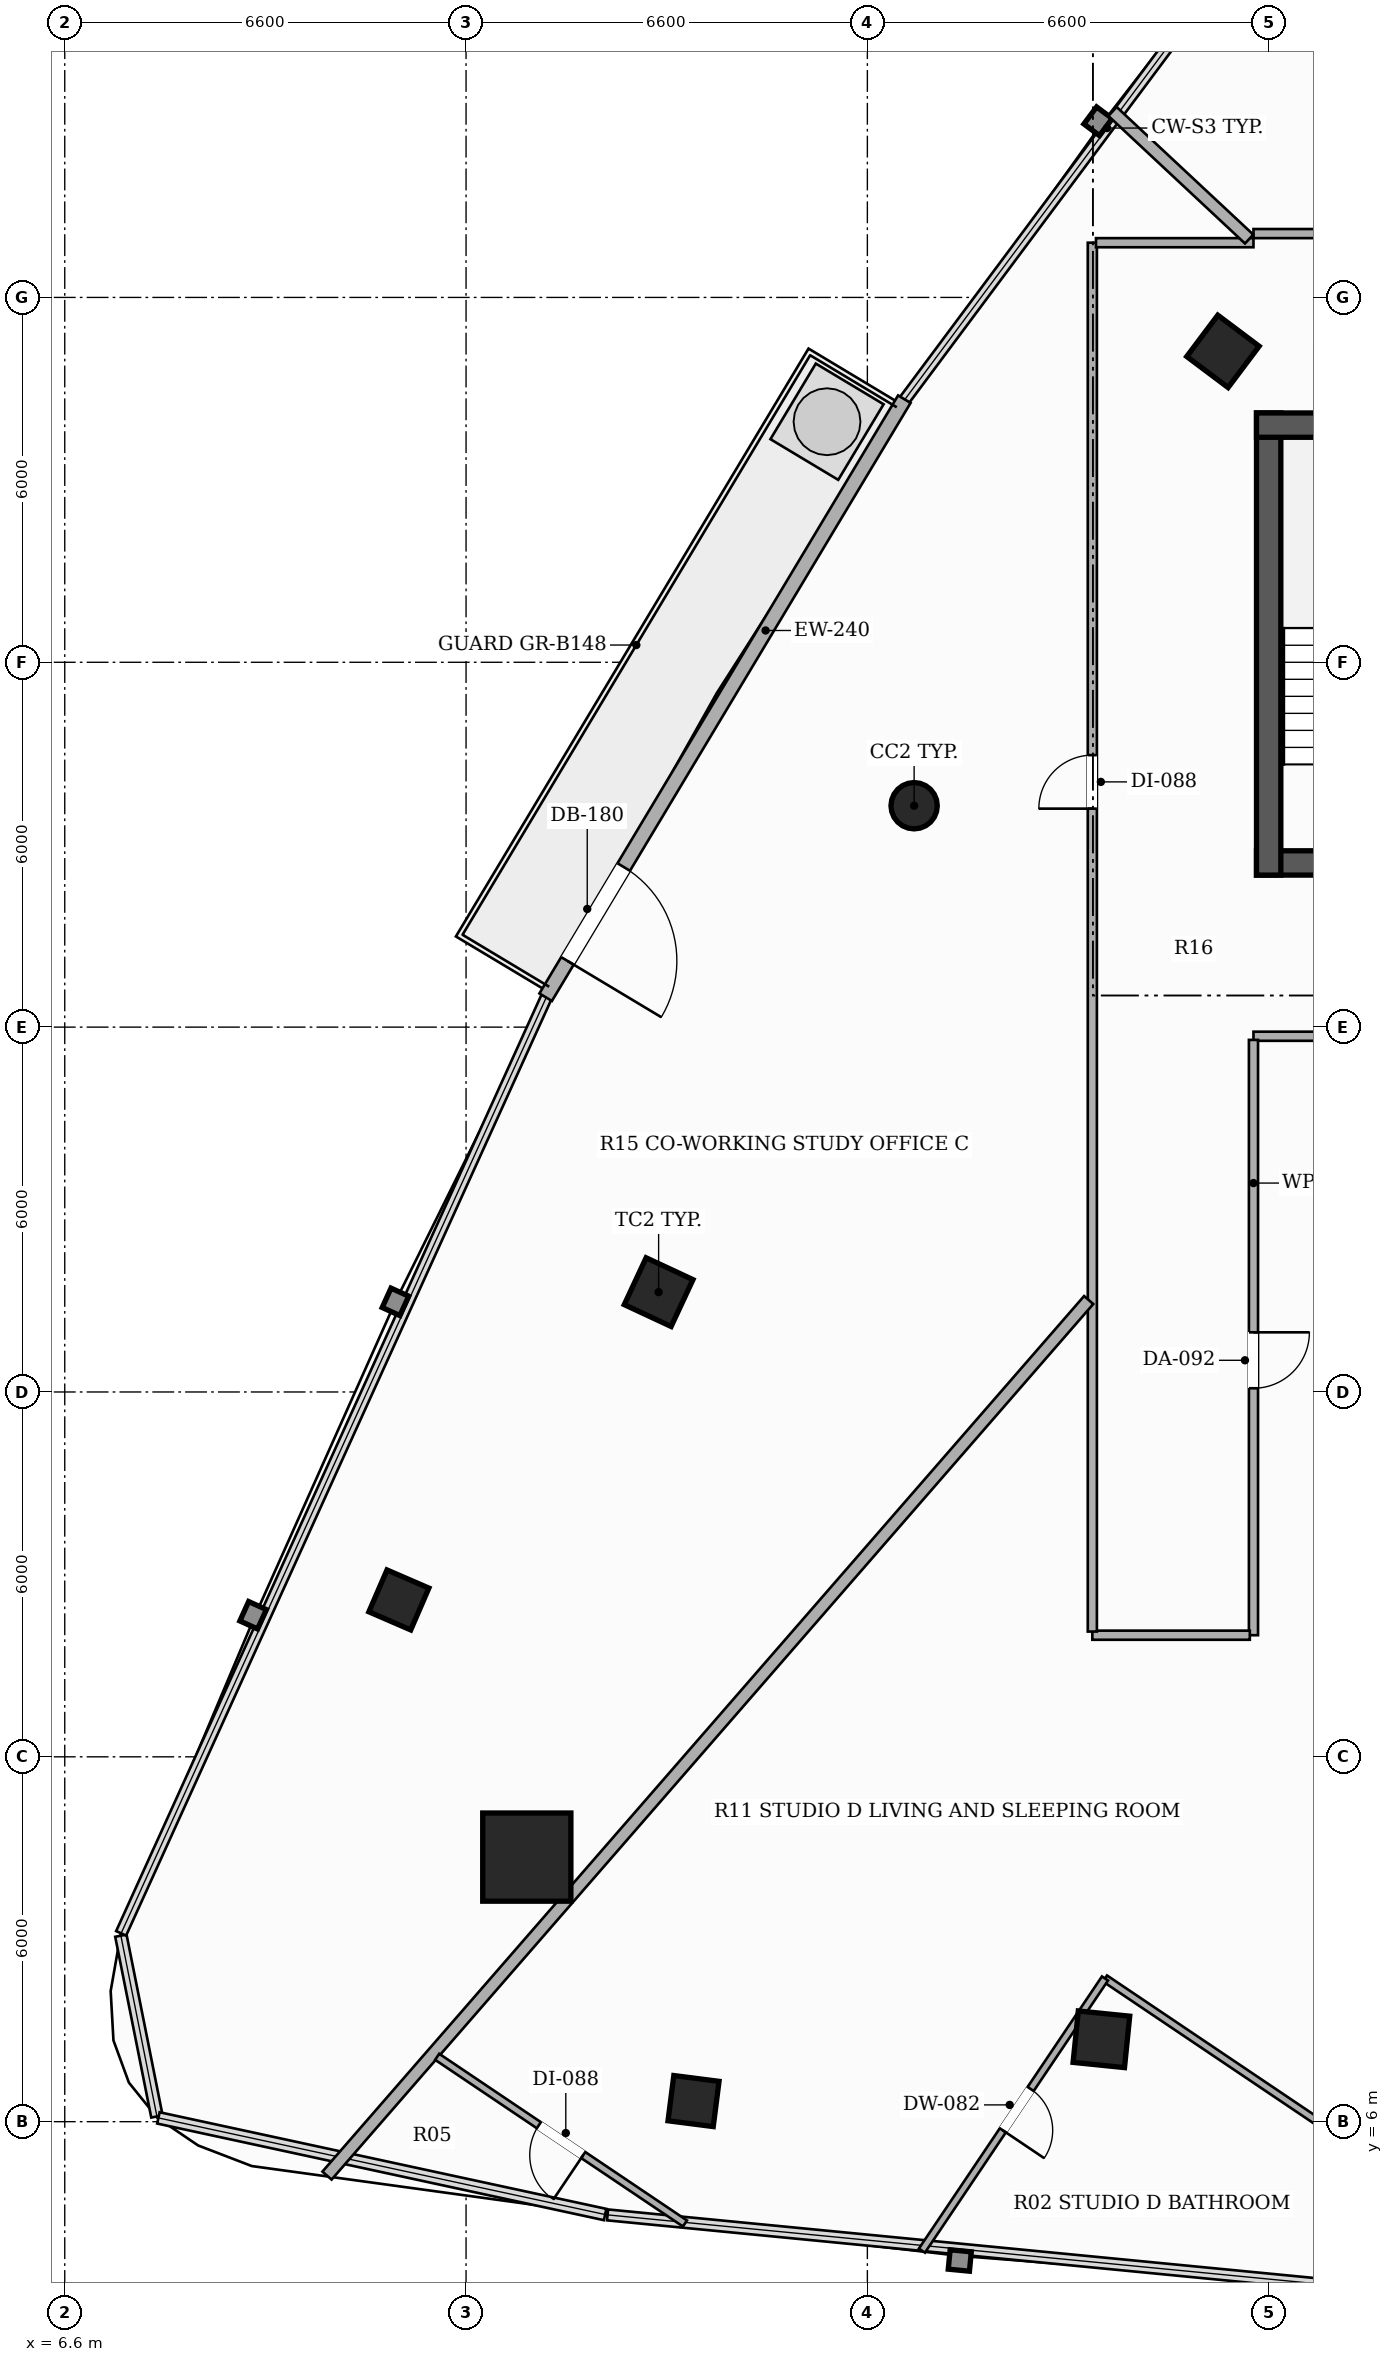
"""IFC4 building model, lengths in metres.
Left out: names, types, materials, properties, quantities, classifications, styles, units other than length and angle.
Written with IfcOpenShell. Run it as: python <this file> out.ifc"""

import sys

from ifc_helpers import new_model, si_unit, direction, frame, frame_2d, origin, origin_2d, place, context, subcontext, project, spatial, rectangle, hollow_rectangle, hollow_circle, extrude, element, fill, save


model = new_model("IFC4")
c1 = context("Model", 3, precision=1e-05, world=origin(), true_north=direction((0.0, 1.0)))
c2 = subcontext(c1, "Body", "Model", "MODEL_VIEW")
j1 = project(units=[si_unit("LENGTHUNIT", "METRE"), si_unit("PLANEANGLEUNIT", "RADIAN")], contexts=[c1])
p1 = place(None, origin())
s1 = spatial("IfcSite", under=j1, at=p1, CompositionType="ELEMENT")
p2 = place(p1, origin())
s2 = spatial("IfcBuilding", under=s1, at=p2, CompositionType="ELEMENT")
p3 = place(p2, frame((0.0, 0.0, 143.0)))
s3 = spatial("IfcBuildingStorey", under=s2, at=p3, CompositionType="ELEMENT", Elevation=143.0)
p4 = place(p3, frame((26.2, 26.7, 0.0), z_axis=(0.0, 0.0, 1.0), x_axis=(1.0, 0.0, 0.0)))
e1 = element("IfcWall", 1, at=p4, inside=s3, PredefinedType="SHEAR", context=c2, shape_type="SweptSolid", body=[
    extrude(rectangle(XDim=13.6, YDim=0.4, at=frame_2d((6.8, 0.0))), origin(), (0.0, 0.0, 1.0), 3.3),
])
p5 = place(p4, frame((4.35, 0.0, 0.0)))
e2 = element("IfcOpeningElement", 2, at=p5, cuts=e1, PredefinedType="OPENING", context=c2, shape_type="SweptSolid", body=[
    extrude(rectangle(XDim=1.05, YDim=2.15, at=frame_2d((0.525, 1.075))), frame((0.0, 0.21, 0.0), z_axis=(0.0, -1.0, 0.0), x_axis=(1.0, 0.0, 0.0)), (0.0, 0.0, 1.0), 0.42),
])
p6 = place(p4, frame((8.3, 0.0, 0.0)))
e3 = element("IfcOpeningElement", 3, at=p6, cuts=e1, PredefinedType="OPENING", context=c2, shape_type="SweptSolid", body=[
    extrude(rectangle(XDim=1.05, YDim=2.15, at=frame_2d((0.525, 1.075))), frame((0.0, 0.21, 0.0), z_axis=(0.0, -1.0, 0.0), x_axis=(1.0, 0.0, 0.0)), (0.0, 0.0, 1.0), 0.42),
])
p7 = place(p3, frame((26.4, 26.5, 0.0), z_axis=(0.0, 0.0, 1.0), x_axis=(0.0, 1.0, 0.0)))
e4 = element("IfcWall", 4, at=p7, inside=s3, PredefinedType="SHEAR", context=c2, shape_type="SweptSolid", body=[
    extrude(rectangle(XDim=7.6, YDim=0.4, at=frame_2d((3.8, 0.0))), origin(), (0.0, 0.0, 1.0), 3.3),
])
p8 = place(p3, frame((26.2, 33.9, 0.0), z_axis=(0.0, 0.0, 1.0), x_axis=(1.0, 0.0, 0.0)))
e5 = element("IfcWall", 5, at=p8, inside=s3, PredefinedType="SHEAR", context=c2, shape_type="SweptSolid", body=[
    extrude(rectangle(XDim=3.68, YDim=0.4, at=frame_2d((1.84, 0.0))), origin(), (0.0, 0.0, 1.0), 3.3),
])
p9 = place(p3, frame((14.199, 10.351, 0.0), z_axis=(0.0, 0.0, 1.0), x_axis=(1.0, 0.0, 0.0)))
e6 = element("IfcColumn", 6, at=p9, inside=s3, PredefinedType="COLUMN", context=c2, shape_type="SweptSolid", body=[
    extrude(hollow_rectangle(XDim=1.45, YDim=1.45, WallThickness=0.045, at=origin_2d()), origin(), (0.0, 0.0, 1.0), 3.3),
])
p10 = place(p3, frame((25.648, 35.113, 0.0), z_axis=(0.0, 0.0, 1.0), x_axis=(0.600420225326, 0.799684658487, 0.0)))
e7 = element("IfcColumn", 7, at=p10, inside=s3, PredefinedType="COLUMN", context=c2, shape_type="SweptSolid", body=[
    extrude(hollow_rectangle(XDim=0.85, YDim=0.85, WallThickness=0.028, at=origin_2d()), origin(), (0.0, 0.0, 1.0), 3.3),
])
p11 = place(p3, frame((20.569, 27.641, 0.0), z_axis=(0.0, 0.0, 1.0), x_axis=(1.0, 0.0, 0.0)))
e8 = element("IfcColumn", 8, at=p11, inside=s3, PredefinedType="COLUMN", context=c2, shape_type="SweptSolid", body=[
    extrude(hollow_circle(Radius=0.381, WallThickness=0.022, at=origin_2d()), origin(), (0.0, 0.0, 1.0), 3.3),
])
for number, where, z_axis, x_axis in (
    (9, (16.367, 19.642, 0.0), (0.0, 0.0, 1.0), (0.423, 0.906, 0.0)),
    (10, (23.649, 7.355, 0.0), (0.0, 0.0, 1.0), (-0.995, 0.101, 0.0)),
):
    element("IfcColumn", number, at=place(p3, frame(where, z_axis=z_axis, x_axis=x_axis)), inside=s3, PredefinedType="COLUMN", context=c2, shape_type="SweptSolid", body=[
        extrude(hollow_rectangle(XDim=0.85, YDim=0.85, WallThickness=0.028, at=origin_2d()), origin(), (0.0, 0.0, 1.0), 3.3),
    ])
for number, where, z_axis, x_axis in (
    (11, (12.095, 14.58, 0.0), (0.0, 0.0, 1.0), (0.397, 0.918, 0.0)),
    (12, (16.941, 6.339, 0.0), (0.0, 0.0, 1.0), (-0.992, 0.127, 0.0)),
):
    element("IfcColumn", number, at=place(p3, frame(where, z_axis=z_axis, x_axis=x_axis)), inside=s3, PredefinedType="COLUMN", context=c2, shape_type="SweptSolid", body=[
        extrude(hollow_rectangle(XDim=0.75, YDim=0.75, WallThickness=0.025, at=origin_2d()), origin(), (0.0, 0.0, 1.0), 3.3),
    ])
p12 = place(p3, frame((20.408, 34.327, 0.0), z_axis=(0.0, 0.0, 1.0), x_axis=(-0.514364263751, -0.857571807009, 0.0)))
e13 = element("IfcWall", 13, at=p12, inside=s3, PredefinedType="SOLIDWALL", context=c2, shape_type="SweptSolid", body=[
    extrude(rectangle(XDim=11.468, YDim=0.24, at=frame_2d((5.734, 0.0))), origin(), (0.0, 0.0, 1.0), 2.584),
])
p13 = place(p12, frame((8.972, 0.0, 0.0)))
e14 = element("IfcOpeningElement", 14, at=p13, cuts=e13, PredefinedType="OPENING", context=c2, shape_type="SweptSolid", body=[
    extrude(rectangle(XDim=1.8, YDim=2.2, at=frame_2d((0.9, 1.1))), frame((0.0, 0.13, 0.0), z_axis=(0.0, -1.0, 0.0), x_axis=(1.0, 0.0, 0.0)), (0.0, 0.0, 1.0), 0.26),
])
p14 = place(p3, frame((31.844, 23.85, 0.0), z_axis=(0.0, 0.0, 1.0), x_axis=(-1.0, 0.0, 0.0)))
e15 = element("IfcWall", 15, at=p14, inside=s3, PredefinedType="PARTITIONING", context=c2, shape_type="SweptSolid", body=[
    extrude(rectangle(XDim=5.694, YDim=0.15, at=frame_2d((2.847, 0.0))), origin(), (0.0, 0.0, 1.0), 2.681),
])
p15 = place(p3, frame((26.15, 23.79, 0.0), z_axis=(0.0, 0.0, 1.0), x_axis=(0.0, -1.0, 0.0)))
e16 = element("IfcWall", 16, at=p15, inside=s3, PredefinedType="PARTITIONING", context=c2, shape_type="SweptSolid", body=[
    extrude(rectangle(XDim=9.79, YDim=0.15, at=frame_2d((4.895, 0.0))), origin(), (0.0, 0.0, 1.0), 2.681),
])
p16 = place(p15, frame((4.809, 0.0, 0.0)))
e17 = element("IfcOpeningElement", 17, at=p16, cuts=e16, PredefinedType="OPENING", context=c2, shape_type="SweptSolid", body=[
    extrude(rectangle(XDim=0.92, YDim=2.15, at=frame_2d((0.46, 1.075))), frame((0.0, 0.085, 0.0), z_axis=(0.0, -1.0, 0.0), x_axis=(1.0, 0.0, 0.0)), (0.0, 0.0, 1.0), 0.17),
])
p17 = place(p3, frame((26.09, 14.0, 0.0), z_axis=(0.0, 0.0, 1.0), x_axis=(-1.0, 0.0, 0.0)))
e18 = element("IfcWall", 18, at=p17, inside=s3, PredefinedType="PARTITIONING", context=c2, shape_type="SweptSolid", body=[
    extrude(rectangle(XDim=2.59, YDim=0.15, at=frame_2d((1.295, 0.0))), origin(), (0.0, 0.0, 1.0), 2.681),
])
p18 = place(p3, frame((23.5, 14.06, 0.0), z_axis=(0.0, 0.0, 1.0), x_axis=(0.0, 1.0, 0.0)))
e19 = element("IfcWall", 19, at=p18, inside=s3, PredefinedType="PARTITIONING", context=c2, shape_type="SweptSolid", body=[
    extrude(rectangle(XDim=22.84, YDim=0.15, at=frame_2d((11.42, 0.0))), origin(), (0.0, 0.0, 1.0), 2.373),
])
p19 = place(p18, frame((13.533, 0.0, 0.0)))
e20 = element("IfcOpeningElement", 20, at=p19, cuts=e19, PredefinedType="OPENING", context=c2, shape_type="SweptSolid", body=[
    extrude(rectangle(XDim=0.88, YDim=2.1, at=frame_2d((0.44, 1.05))), frame((0.0, 0.085, 0.0), z_axis=(0.0, -1.0, 0.0), x_axis=(1.0, 0.0, 0.0)), (0.0, 0.0, 1.0), 0.17),
])
p20 = place(p3, frame((23.56, 36.9, 0.0), z_axis=(0.0, 0.0, 1.0), x_axis=(1.0, 0.0, 0.0)))
e21 = element("IfcWall", 21, at=p20, inside=s3, PredefinedType="PARTITIONING", context=c2, shape_type="SweptSolid", body=[
    extrude(rectangle(XDim=2.59, YDim=0.15, at=frame_2d((1.295, 0.0))), origin(), (0.0, 0.0, 1.0), 2.373),
])
p21 = place(p3, frame((26.15, 37.05, 0.0), z_axis=(0.0, 0.0, 1.0), x_axis=(1.0, 0.0, 0.0)))
e22 = element("IfcWall", 22, at=p21, inside=s3, PredefinedType="PARTITIONING", context=c2, shape_type="SweptSolid", body=[
    extrude(rectangle(XDim=2.0, YDim=0.15, at=frame_2d((1.0, 0.0))), origin(), (0.0, 0.0, 1.0), 2.373),
])
p22 = place(p3, frame((26.079, 36.96, 0.0), z_axis=(0.0, 0.0, 1.0), x_axis=(-0.730912649308, 0.682471024354, 0.0)))
e23 = element("IfcWall", 23, at=p22, inside=s3, PredefinedType="PARTITIONING", context=c2, shape_type="SweptSolid", body=[
    extrude(rectangle(XDim=3.074, YDim=0.2, at=frame_2d((1.537, 0.0))), origin(), (0.0, 0.0, 1.0), 2.373),
])
p23 = place(p3, frame((23.44, 19.512, 0.0), z_axis=(0.0, 0.0, 1.0), x_axis=(-0.656359216658, -0.754448526215, 0.0)))
e24 = element("IfcWall", 24, at=p23, inside=s3, PredefinedType="PARTITIONING", context=c2, shape_type="SweptSolid", body=[
    extrude(rectangle(XDim=19.085, YDim=0.2, at=frame_2d((9.543, 0.0))), origin(), (0.0, 0.0, 1.0), 2.373),
])
p24 = place(p3, frame((27.879, 5.548, 0.0), z_axis=(0.0, 0.0, 1.0), x_axis=(-0.829629274352, 0.558314666777, 0.0)))
e25 = element("IfcWall", 25, at=p24, inside=s3, PredefinedType="PARTITIONING", context=c2, shape_type="SweptSolid", body=[
    extrude(rectangle(XDim=5.027, YDim=0.12, at=frame_2d((2.514, 0.0))), origin(), (0.0, 0.0, 1.0), 2.373),
])
p25 = place(p3, frame((23.708, 8.355, 0.0), z_axis=(0.0, 0.0, 1.0), x_axis=(-0.55815233332, -0.829738496642, 0.0)))
e26 = element("IfcWall", 26, at=p25, inside=s3, PredefinedType="PARTITIONING", context=c2, shape_type="SweptSolid", body=[
    extrude(rectangle(XDim=5.395, YDim=0.12, at=frame_2d((2.697, 0.0))), origin(), (0.0, 0.0, 1.0), 2.373),
])
p26 = place(p25, frame((2.19, 0.0, 0.0)))
e27 = element("IfcOpeningElement", 27, at=p26, cuts=e26, PredefinedType="OPENING", context=c2, shape_type="SweptSolid", body=[
    extrude(rectangle(XDim=0.82, YDim=2.1, at=frame_2d((0.41, 1.05))), frame((0.0, 0.07, 0.0), z_axis=(0.0, -1.0, 0.0), x_axis=(1.0, 0.0, 0.0)), (0.0, 0.0, 1.0), 0.14),
])
p27 = place(p3, frame((16.8, 4.326, 0.0), z_axis=(0.0, 0.0, 1.0), x_axis=(-0.829756434678, 0.558125666056, 0.0)))
e28 = element("IfcWall", 28, at=p27, inside=s3, PredefinedType="PARTITIONING", context=c2, shape_type="SweptSolid", body=[
    extrude(rectangle(XDim=4.911, YDim=0.12, at=frame_2d((2.456, 0.0))), origin(), (0.0, 0.0, 1.0), 3.02),
])
p28 = place(p27, frame((2.016, 0.0, 0.0)))
e29 = element("IfcOpeningElement", 29, at=p28, cuts=e28, PredefinedType="OPENING", context=c2, shape_type="SweptSolid", body=[
    extrude(rectangle(XDim=0.88, YDim=2.1, at=frame_2d((0.44, 1.05))), frame((0.0, 0.07, 0.0), z_axis=(0.0, -1.0, 0.0), x_axis=(1.0, 0.0, 0.0)), (0.0, 0.0, 1.0), 0.14),
])
p29 = place(p13, origin())
e30 = element("IfcDoor", 30, at=p29, inside=s3, OperationType="SINGLE_SWING_RIGHT", PredefinedType="DOOR", context=c2, shape_type="SweptSolid", body=[
    extrude(rectangle(XDim=1.8, YDim=2.2, at=frame_2d((0.9, 1.1))), frame((0.0, 0.025, 0.0), z_axis=(0.0, -1.0, 0.0), x_axis=(1.0, 0.0, 0.0)), (0.0, 0.0, 1.0), 0.05),
])
fill(e14, e30)
p30 = place(p19, origin())
e31 = element("IfcDoor", 31, at=p30, inside=s3, OperationType="SINGLE_SWING_LEFT", PredefinedType="DOOR", context=c2, shape_type="SweptSolid", body=[
    extrude(rectangle(XDim=0.88, YDim=2.1, at=frame_2d((0.44, 1.05))), frame((0.0, 0.025, 0.0), z_axis=(0.0, -1.0, 0.0), x_axis=(1.0, 0.0, 0.0)), (0.0, 0.0, 1.0), 0.05),
])
fill(e20, e31)
p31 = place(p16, origin())
e32 = element("IfcDoor", 32, at=p31, inside=s3, OperationType="SINGLE_SWING_LEFT", PredefinedType="DOOR", context=c2, shape_type="SweptSolid", body=[
    extrude(rectangle(XDim=0.92, YDim=2.15, at=frame_2d((0.46, 1.075))), frame((0.0, 0.025, 0.0), z_axis=(0.0, -1.0, 0.0), x_axis=(1.0, 0.0, 0.0)), (0.0, 0.0, 1.0), 0.05),
])
fill(e17, e32)
p32 = place(p26, origin())
e33 = element("IfcDoor", 33, at=p32, inside=s3, OperationType="SINGLE_SWING_RIGHT", PredefinedType="DOOR", context=c2, shape_type="SweptSolid", body=[
    extrude(rectangle(XDim=0.82, YDim=2.1, at=frame_2d((0.41, 1.05))), frame((0.0, 0.025, 0.0), z_axis=(0.0, -1.0, 0.0), x_axis=(1.0, 0.0, 0.0)), (0.0, 0.0, 1.0), 0.05),
])
fill(e27, e33)
p33 = place(p28, origin())
e34 = element("IfcDoor", 34, at=p33, inside=s3, OperationType="SINGLE_SWING_LEFT", PredefinedType="DOOR", context=c2, shape_type="SweptSolid", body=[
    extrude(rectangle(XDim=0.88, YDim=2.1, at=frame_2d((0.44, 1.05))), frame((0.0, 0.025, 0.0), z_axis=(0.0, -1.0, 0.0), x_axis=(1.0, 0.0, 0.0)), (0.0, 0.0, 1.0), 0.05),
])
fill(e29, e34)
save(model, sys.argv[1])
